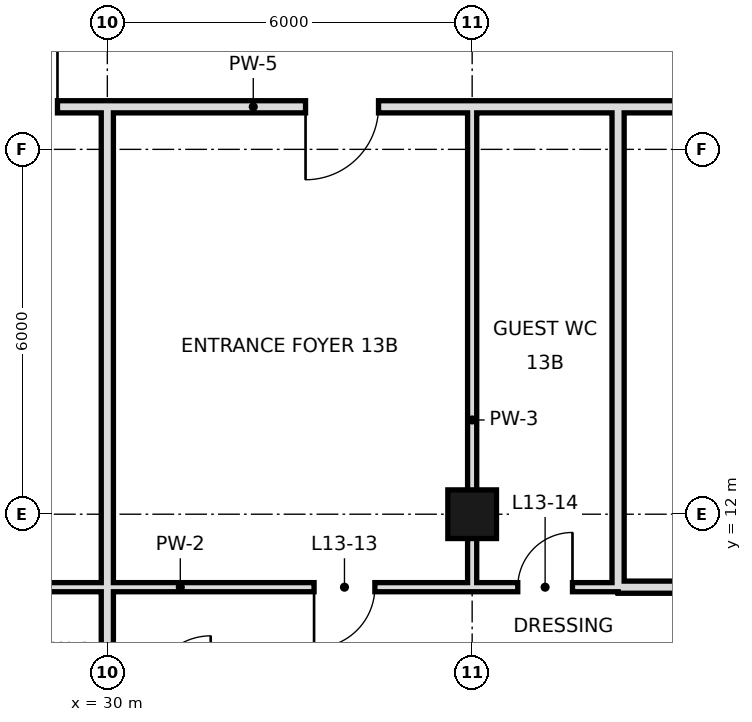
"""IFC4 building model, lengths in metres.
Left out: names, types, materials, properties, quantities, classifications, styles, units other than length and angle.
Written with IfcOpenShell. Run it as: python <this file> out.ifc"""

import sys

from ifc_helpers import new_model, si_unit, direction, frame, frame_2d, origin, origin_2d, place, context, subcontext, project, spatial, rectangle, hollow_rectangle, extrude, element, fill, save


model = new_model("IFC4")
c1 = context("Model", 3, precision=1e-05, world=origin(), true_north=direction((0.0, 1.0)))
c2 = subcontext(c1, "Body", "Model", "MODEL_VIEW")
j1 = project(units=[si_unit("LENGTHUNIT", "METRE"), si_unit("PLANEANGLEUNIT", "RADIAN")], contexts=[c1])
p1 = place(None, origin())
s1 = spatial("IfcSite", under=j1, at=p1, CompositionType="ELEMENT")
p2 = place(p1, origin())
s2 = spatial("IfcBuilding", under=s1, at=p2, CompositionType="ELEMENT")
p3 = place(p2, frame((0.0, 0.0, 67.8)))
s3 = spatial("IfcBuildingStorey", under=s2, at=p3, CompositionType="ELEMENT", Elevation=67.8)
p4 = place(p3, frame((36.0, 12.0, 0.0), z_axis=(0.0, 0.0, 1.0), x_axis=(1.0, 0.0, 0.0)))
e1 = element("IfcColumn", 1, at=p4, inside=s3, PredefinedType="COLUMN", context=c2, shape_type="SweptSolid", body=[
    extrude(hollow_rectangle(XDim=0.8, YDim=0.8, WallThickness=0.04, at=origin_2d()), origin(), (0.0, 0.0, 1.0), 3.6),
])
p5 = place(p3, frame((30.0, -0.6, 0.0), z_axis=(0.0, 0.0, 1.0), x_axis=(0.0, 1.0, 0.0)))
e2 = element("IfcWall", 2, at=p5, inside=s3, PredefinedType="SOLIDWALL", context=c2, shape_type="SweptSolid", body=[
    extrude(rectangle(XDim=19.3, YDim=0.2, at=frame_2d((9.65, 0.0))), origin(), (0.0, 0.0, 1.0), 2.72),
])
p6 = place(p3, frame((36.0, 10.8, 0.0), z_axis=(0.0, 0.0, 1.0), x_axis=(0.0, 1.0, 0.0)))
e3 = element("IfcWall", 3, at=p6, inside=s3, PredefinedType="PARTITIONING", context=c2, shape_type="SweptSolid", body=[
    extrude(rectangle(XDim=7.9, YDim=0.15, at=frame_2d((3.95, 0.0))), origin(), (0.0, 0.0, 1.0), 2.72),
])
p7 = place(p3, frame((38.4, 10.8, 0.0), z_axis=(0.0, 0.0, 1.0), x_axis=(0.0, 1.0, 0.0)))
e4 = element("IfcWall", 4, at=p7, inside=s3, PredefinedType="SOLIDWALL", context=c2, shape_type="SweptSolid", body=[
    extrude(rectangle(XDim=7.9, YDim=0.2, at=frame_2d((3.95, 0.0))), origin(), (0.0, 0.0, 1.0), 2.72),
])
p8 = place(p3, frame((38.4, 10.8, 0.0), z_axis=(0.0, 0.0, 1.0), x_axis=(1.0, 0.0, 0.0)))
e5 = element("IfcWall", 5, at=p8, inside=s3, PredefinedType="SOLIDWALL", context=c2, shape_type="SweptSolid", body=[
    extrude(rectangle(XDim=4.2, YDim=0.2, at=frame_2d((2.1, 0.0))), origin(), (0.0, 0.0, 1.0), 2.72),
])
p9 = place(p8, frame((1.6, 0.0, 0.0)))
e6 = element("IfcOpeningElement", 6, at=p9, cuts=e5, PredefinedType="OPENING", context=c2, shape_type="SweptSolid", body=[
    extrude(rectangle(XDim=1.0, YDim=2.4, at=frame_2d((0.5, 1.2))), frame((0.0, 0.11, 0.0), z_axis=(0.0, -1.0, 0.0), x_axis=(1.0, 0.0, 0.0)), (0.0, 0.0, 1.0), 0.22),
])
p10 = place(p3, frame((26.4, 10.8, 0.0), z_axis=(0.0, 0.0, 1.0), x_axis=(1.0, 0.0, 0.0)))
e7 = element("IfcWall", 7, at=p10, inside=s3, PredefinedType="PARTITIONING", context=c2, shape_type="SweptSolid", body=[
    extrude(rectangle(XDim=9.6, YDim=0.15, at=frame_2d((4.8, 0.0))), origin(), (0.0, 0.0, 1.0), 3.42),
])
p11 = place(p10, frame((1.3, 0.0, 0.0)))
e8 = element("IfcOpeningElement", 8, at=p11, cuts=e7, PredefinedType="OPENING", context=c2, shape_type="SweptSolid", body=[
    extrude(rectangle(XDim=1.0, YDim=2.4, at=frame_2d((0.5, 1.2))), frame((0.0, 0.085, 0.0), z_axis=(0.0, -1.0, 0.0), x_axis=(1.0, 0.0, 0.0)), (0.0, 0.0, 1.0), 0.17),
])
p12 = place(p10, frame((7.0, 0.0, 0.0)))
e9 = element("IfcOpeningElement", 9, at=p12, cuts=e7, PredefinedType="OPENING", context=c2, shape_type="SweptSolid", body=[
    extrude(rectangle(XDim=1.0, YDim=2.4, at=frame_2d((0.5, 1.2))), frame((0.0, 0.085, 0.0), z_axis=(0.0, -1.0, 0.0), x_axis=(1.0, 0.0, 0.0)), (0.0, 0.0, 1.0), 0.17),
])
p13 = place(p3, frame((36.0, 10.8, 0.0), z_axis=(0.0, 0.0, 1.0), x_axis=(1.0, 0.0, 0.0)))
e10 = element("IfcWall", 10, at=p13, inside=s3, PredefinedType="PARTITIONING", context=c2, shape_type="SweptSolid", body=[
    extrude(rectangle(XDim=2.4, YDim=0.15, at=frame_2d((1.2, 0.0))), origin(), (0.0, 0.0, 1.0), 3.42),
])
p14 = place(p13, frame((0.75, 0.0, 0.0)))
e11 = element("IfcOpeningElement", 11, at=p14, cuts=e10, PredefinedType="OPENING", context=c2, shape_type="SweptSolid", body=[
    extrude(rectangle(XDim=0.9, YDim=2.4, at=frame_2d((0.45, 1.2))), frame((0.0, 0.085, 0.0), z_axis=(0.0, -1.0, 0.0), x_axis=(1.0, 0.0, 0.0)), (0.0, 0.0, 1.0), 0.17),
])
p15 = place(p3, frame((26.4, 18.7, 0.0), z_axis=(0.0, 0.0, 1.0), x_axis=(1.0, 0.0, 0.0)))
e12 = element("IfcWall", 12, at=p15, inside=s3, PredefinedType="SOLIDWALL", context=c2, shape_type="SweptSolid", body=[
    extrude(rectangle(XDim=12.0, YDim=0.2, at=frame_2d((6.0, 0.0))), origin(), (0.0, 0.0, 1.0), 2.72),
])
p16 = place(p15, frame((1.58, 0.0, 0.0)))
e13 = element("IfcOpeningElement", 13, at=p16, cuts=e12, PredefinedType="OPENING", context=c2, shape_type="SweptSolid", body=[
    extrude(rectangle(XDim=1.2, YDim=2.4, at=frame_2d((0.6, 1.2))), frame((0.0, 0.11, 0.0), z_axis=(0.0, -1.0, 0.0), x_axis=(1.0, 0.0, 0.0)), (0.0, 0.0, 1.0), 0.22),
])
p17 = place(p15, frame((6.86, 0.0, 0.0)))
e14 = element("IfcOpeningElement", 14, at=p17, cuts=e12, PredefinedType="OPENING", context=c2, shape_type="SweptSolid", body=[
    extrude(rectangle(XDim=1.2, YDim=2.4, at=frame_2d((0.6, 1.2))), frame((0.0, 0.11, 0.0), z_axis=(0.0, -1.0, 0.0), x_axis=(1.0, 0.0, 0.0)), (0.0, 0.0, 1.0), 0.22),
])
p18 = place(p3, frame((38.4, 18.7, 0.0), z_axis=(0.0, 0.0, 1.0), x_axis=(1.0, 0.0, 0.0)))
e15 = element("IfcWall", 15, at=p18, inside=s3, PredefinedType="SOLIDWALL", context=c2, shape_type="SweptSolid", body=[
    extrude(rectangle(XDim=4.2, YDim=0.2, at=frame_2d((2.1, 0.0))), origin(), (0.0, 0.0, 1.0), 2.72),
])
p19 = place(p12, frame((1.0, 0.0, 0.0), z_axis=(0.0, 0.0, 1.0), x_axis=(-1.0, 0.0, 0.0)))
e16 = element("IfcDoor", 16, at=p19, inside=s3, OperationType="SINGLE_SWING_RIGHT", PredefinedType="DOOR", context=c2, shape_type="SweptSolid", body=[
    extrude(rectangle(XDim=1.0, YDim=2.4, at=frame_2d((0.5, 1.2))), frame((0.0, 0.025, 0.0), z_axis=(0.0, -1.0, 0.0), x_axis=(1.0, 0.0, 0.0)), (0.0, 0.0, 1.0), 0.05),
])
fill(e9, e16)
p20 = place(p14, frame((0.9, 0.0, 0.0), z_axis=(0.0, 0.0, 1.0), x_axis=(-1.0, 0.0, 0.0)))
e17 = element("IfcDoor", 17, at=p20, inside=s3, OperationType="SINGLE_SWING_LEFT", PredefinedType="DOOR", context=c2, shape_type="SweptSolid", body=[
    extrude(rectangle(XDim=0.9, YDim=2.4, at=frame_2d((0.45, 1.2))), frame((0.0, 0.025, 0.0), z_axis=(0.0, -1.0, 0.0), x_axis=(1.0, 0.0, 0.0)), (0.0, 0.0, 1.0), 0.05),
])
fill(e11, e17)
p21 = place(p16, frame((1.2, 0.0, 0.0), z_axis=(0.0, 0.0, 1.0), x_axis=(-1.0, 0.0, 0.0)))
e18 = element("IfcDoor", 18, at=p21, inside=s3, OperationType="SINGLE_SWING_LEFT", PredefinedType="DOOR", context=c2, shape_type="SweptSolid", body=[
    extrude(rectangle(XDim=1.2, YDim=2.4, at=frame_2d((0.6, 1.2))), frame((0.0, 0.025, 0.0), z_axis=(0.0, -1.0, 0.0), x_axis=(1.0, 0.0, 0.0)), (0.0, 0.0, 1.0), 0.05),
])
fill(e13, e18)
p22 = place(p17, frame((1.2, 0.0, 0.0), z_axis=(0.0, 0.0, 1.0), x_axis=(-1.0, 0.0, 0.0)))
e19 = element("IfcDoor", 19, at=p22, inside=s3, OperationType="SINGLE_SWING_RIGHT", PredefinedType="DOOR", context=c2, shape_type="SweptSolid", body=[
    extrude(rectangle(XDim=1.2, YDim=2.4, at=frame_2d((0.6, 1.2))), frame((0.0, 0.025, 0.0), z_axis=(0.0, -1.0, 0.0), x_axis=(1.0, 0.0, 0.0)), (0.0, 0.0, 1.0), 0.05),
])
fill(e14, e19)
save(model, sys.argv[1])
